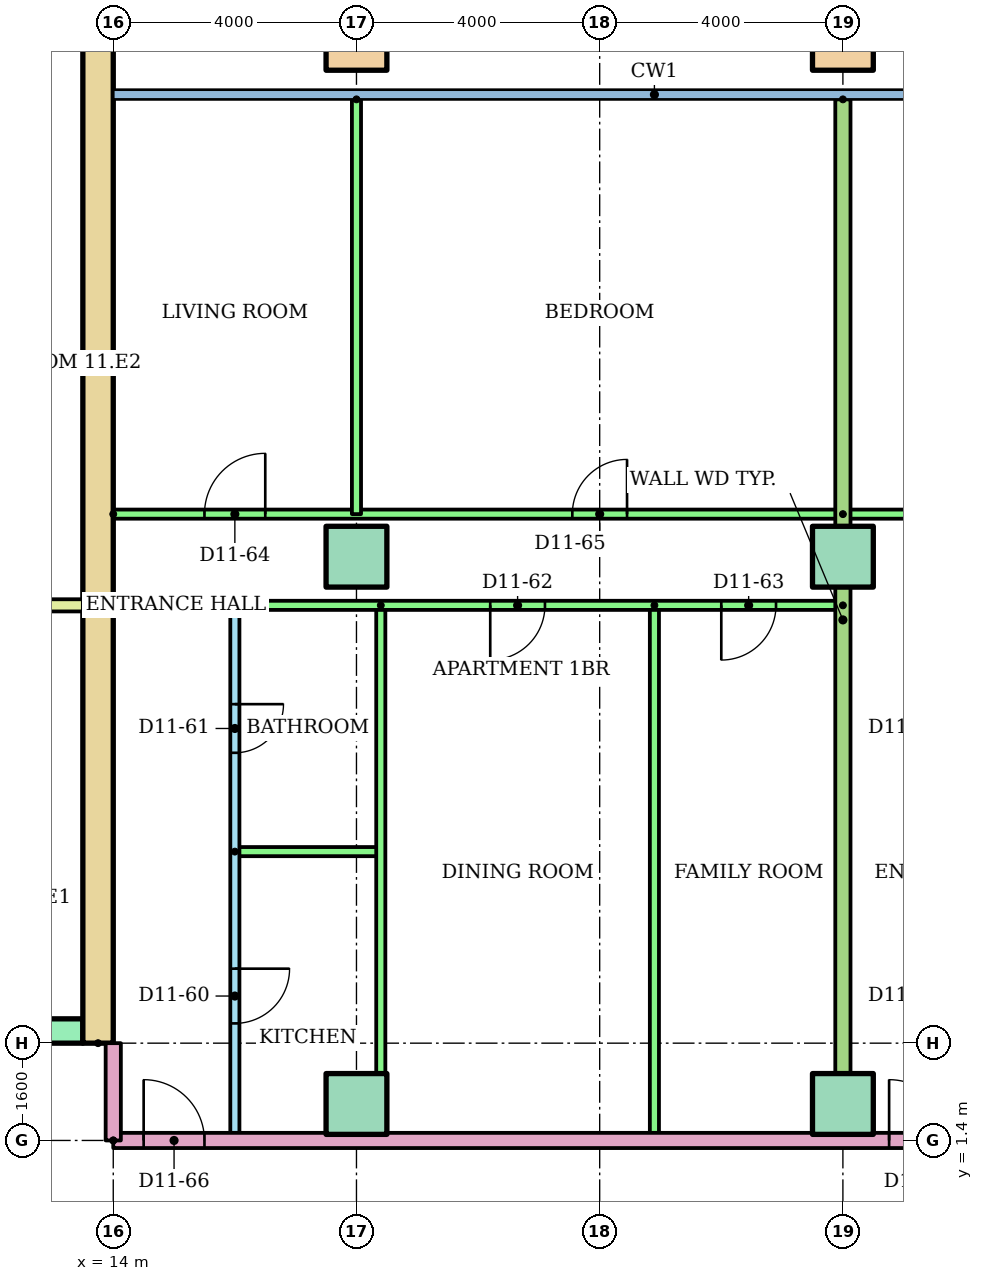
"""IFC4 building model, lengths in metres.
Left out: names, types, materials, properties, quantities, classifications, styles, units other than length and angle.
Written with IfcOpenShell. Run it as: python <this file> out.ifc"""

import sys

from ifc_helpers import new_model, si_unit, direction, frame, frame_2d, origin, origin_2d, place, context, subcontext, project, spatial, rectangle, hollow_rectangle, extrude, element, fill, save


model = new_model("IFC4")
c1 = context("Model", 3, precision=1e-05, world=origin(), true_north=direction((0.0, 1.0)))
c2 = subcontext(c1, "Body", "Model", "MODEL_VIEW")
j1 = project(units=[si_unit("LENGTHUNIT", "METRE"), si_unit("PLANEANGLEUNIT", "RADIAN")], contexts=[c1])
p1 = place(None, origin())
s1 = spatial("IfcSite", under=j1, at=p1, CompositionType="ELEMENT")
p2 = place(p1, origin())
s2 = spatial("IfcBuilding", under=s1, at=p2, CompositionType="ELEMENT")
p3 = place(p2, frame((0.0, 0.0, 44.8)))
s3 = spatial("IfcBuildingStorey", under=s2, at=p3, CompositionType="ELEMENT", Elevation=44.8)
for number, where in (
    (1, (18.0, 2.0, 0.0)),
    (2, (26.0, 2.0, 0.0)),
    (3, (18.0, 11.0, 0.0)),
    (4, (26.0, 11.0, 0.0)),
):
    element("IfcColumn", number, at=place(p3, frame(where)), inside=s3, PredefinedType="COLUMN", context=c2, shape_type="SweptSolid", body=[
        extrude(rectangle(XDim=1.0, YDim=1.0, at=origin_2d()), origin(), (0.0, 0.0, 1.0), 3.2),
    ])
for number, where in (
    (5, (18.0, 19.5, 0.0)),
    (6, (26.0, 19.5, 0.0)),
):
    element("IfcColumn", number, at=place(p3, frame(where)), inside=s3, PredefinedType="COLUMN", context=c2, shape_type="SweptSolid", body=[
        extrude(hollow_rectangle(XDim=1.0, YDim=1.0, WallThickness=0.05, at=origin_2d()), origin(), (0.0, 0.0, 1.0), 3.2),
    ])
p4 = place(p3, frame((13.75, 3.0, 0.0), z_axis=(0.0, 0.0, 1.0), x_axis=(0.0, 1.0, 0.0)))
e7 = element("IfcWall", 7, at=p4, inside=s3, PredefinedType="SHEAR", context=c2, shape_type="SweptSolid", body=[
    extrude(rectangle(XDim=17.0, YDim=0.5, at=frame_2d((8.5, 0.0))), origin(), (0.0, 0.0, 1.0), 2.92),
])
p5 = place(p3, frame((-13.5, 3.2, 0.0)))
e8 = element("IfcWall", 8, at=p5, inside=s3, PredefinedType="SHEAR", context=c2, shape_type="SweptSolid", body=[
    extrude(rectangle(XDim=27.0, YDim=0.4, at=frame_2d((13.5, 0.0))), origin(), (0.0, 0.0, 1.0), 2.92),
])
p6 = place(p5, frame((6.861, 0.0, 0.0)))
e9 = element("IfcOpeningElement", 9, at=p6, cuts=e8, PredefinedType="OPENING", context=c2, shape_type="SweptSolid", body=[
    extrude(rectangle(XDim=1.1, YDim=2.1, at=frame_2d((0.55, 1.05))), frame((0.0, 0.21, 0.0), z_axis=(0.0, -1.0, 0.0), x_axis=(1.0, 0.0, 0.0)), (0.0, 0.0, 1.0), 0.42),
])
p7 = place(p5, frame((9.906, 0.0, 0.0)))
e10 = element("IfcOpeningElement", 10, at=p7, cuts=e8, PredefinedType="OPENING", context=c2, shape_type="SweptSolid", body=[
    extrude(rectangle(XDim=1.1, YDim=2.1, at=frame_2d((0.55, 1.05))), frame((0.0, 0.21, 0.0), z_axis=(0.0, -1.0, 0.0), x_axis=(1.0, 0.0, 0.0)), (0.0, 0.0, 1.0), 0.42),
])
p8 = place(p5, frame((15.994, 0.0, 0.0)))
e11 = element("IfcOpeningElement", 11, at=p8, cuts=e8, PredefinedType="OPENING", context=c2, shape_type="SweptSolid", body=[
    extrude(rectangle(XDim=1.1, YDim=2.1, at=frame_2d((0.55, 1.05))), frame((0.0, 0.21, 0.0), z_axis=(0.0, -1.0, 0.0), x_axis=(1.0, 0.0, 0.0)), (0.0, 0.0, 1.0), 0.42),
])
p9 = place(p5, frame((19.039, 0.0, 0.0)))
e12 = element("IfcOpeningElement", 12, at=p9, cuts=e8, PredefinedType="OPENING", context=c2, shape_type="SweptSolid", body=[
    extrude(rectangle(XDim=1.1, YDim=2.1, at=frame_2d((0.55, 1.05))), frame((0.0, 0.21, 0.0), z_axis=(0.0, -1.0, 0.0), x_axis=(1.0, 0.0, 0.0)), (0.0, 0.0, 1.0), 0.42),
])
p10 = place(p5, frame((12.6, 0.0, 0.0)))
e13 = element("IfcOpeningElement", 13, at=p10, cuts=e8, PredefinedType="OPENING", context=c2, shape_type="SweptSolid", body=[
    extrude(rectangle(XDim=1.8, YDim=2.1, at=frame_2d((0.9, 1.05))), frame((0.0, 0.21, 0.0), z_axis=(0.0, -1.0, 0.0), x_axis=(1.0, 0.0, 0.0)), (0.0, 0.0, 1.0), 0.42),
])
p11 = place(p3, frame((9.6, 10.2, 0.0)))
e14 = element("IfcWall", 14, at=p11, inside=s3, PredefinedType="PARTITIONING", context=c2, shape_type="SweptSolid", body=[
    extrude(rectangle(XDim=3.9, YDim=0.2, at=frame_2d((1.95, 0.0))), origin(), (0.0, 0.0, 1.0), 2.92),
])
p12 = place(p3, frame((16.0, 10.2, 0.0), z_axis=(0.0, 0.0, 1.0), x_axis=(0.0, -1.0, 0.0)))
e15 = element("IfcWall", 15, at=p12, inside=s3, PredefinedType="PARTITIONING", context=c2, shape_type="SweptSolid", body=[
    extrude(rectangle(XDim=8.8, YDim=0.15, at=frame_2d((4.4, 0.0))), origin(), (0.0, 0.0, 1.0), 2.4),
])
p13 = place(p12, frame((5.975, 0.0, 0.0)))
e16 = element("IfcOpeningElement", 16, at=p13, cuts=e15, PredefinedType="OPENING", context=c2, shape_type="SweptSolid", body=[
    extrude(rectangle(XDim=0.9, YDim=2.1, at=frame_2d((0.45, 1.05))), frame((0.0, 0.085, 0.0), z_axis=(0.0, -1.0, 0.0), x_axis=(1.0, 0.0, 0.0)), (0.0, 0.0, 1.0), 0.17),
])
p14 = place(p12, frame((1.625, 0.0, 0.0)))
e17 = element("IfcOpeningElement", 17, at=p14, cuts=e15, PredefinedType="OPENING", context=c2, shape_type="SweptSolid", body=[
    extrude(rectangle(XDim=0.8, YDim=2.1, at=frame_2d((0.4, 1.05))), frame((0.0, 0.085, 0.0), z_axis=(0.0, -1.0, 0.0), x_axis=(1.0, 0.0, 0.0)), (0.0, 0.0, 1.0), 0.17),
])
p15 = place(p3, frame((16.0, 6.15, 0.0)))
e18 = element("IfcWall", 18, at=p15, inside=s3, PredefinedType="PARTITIONING", context=c2, shape_type="SweptSolid", body=[
    extrude(rectangle(XDim=2.4, YDim=0.15, at=frame_2d((1.2, 0.0))), origin(), (0.0, 0.0, 1.0), 2.4),
])
for number, where, z_axis, x_axis in (
    (19, (18.4, 10.2, 0.0), (0.0, 0.0, 1.0), (0.0, -1.0, 0.0)),
    (20, (22.9, 10.2, 0.0), (0.0, 0.0, 1.0), (0.0, -1.0, 0.0)),
):
    element("IfcWall", number, at=place(p3, frame(where, z_axis=z_axis, x_axis=x_axis)), inside=s3, PredefinedType="PARTITIONING", context=c2, shape_type="SweptSolid", body=[
        extrude(rectangle(XDim=8.8, YDim=0.15, at=frame_2d((4.4, 0.0))), origin(), (0.0, 0.0, 1.0), 2.4),
    ])
p16 = place(p3, frame((26.0, 10.2, 0.0), z_axis=(0.0, 0.0, 1.0), x_axis=(-1.0, 0.0, 0.0)))
e21 = element("IfcWall", 21, at=p16, inside=s3, PredefinedType="PARTITIONING", context=c2, shape_type="SweptSolid", body=[
    extrude(rectangle(XDim=10.0, YDim=0.15, at=frame_2d((5.0, 0.0))), origin(), (0.0, 0.0, 1.0), 2.4),
])
p17 = place(p16, frame((4.9, 0.0, 0.0)))
e22 = element("IfcOpeningElement", 22, at=p17, cuts=e21, PredefinedType="OPENING", context=c2, shape_type="SweptSolid", body=[
    extrude(rectangle(XDim=0.9, YDim=2.1, at=frame_2d((0.45, 1.05))), frame((0.0, 0.085, 0.0), z_axis=(0.0, -1.0, 0.0), x_axis=(1.0, 0.0, 0.0)), (0.0, 0.0, 1.0), 0.17),
])
p18 = place(p16, frame((1.1, 0.0, 0.0)))
e23 = element("IfcOpeningElement", 23, at=p18, cuts=e21, PredefinedType="OPENING", context=c2, shape_type="SweptSolid", body=[
    extrude(rectangle(XDim=0.9, YDim=2.1, at=frame_2d((0.45, 1.05))), frame((0.0, 0.085, 0.0), z_axis=(0.0, -1.0, 0.0), x_axis=(1.0, 0.0, 0.0)), (0.0, 0.0, 1.0), 0.17),
])
p19 = place(p3, frame((14.0, 11.7, 0.0)))
e24 = element("IfcWall", 24, at=p19, inside=s3, PredefinedType="PARTITIONING", context=c2, shape_type="SweptSolid", body=[
    extrude(rectangle(XDim=12.0, YDim=0.15, at=frame_2d((6.0, 0.0))), origin(), (0.0, 0.0, 1.0), 2.4),
])
p20 = place(p19, frame((1.5, 0.0, 0.0)))
e25 = element("IfcOpeningElement", 25, at=p20, cuts=e24, PredefinedType="OPENING", context=c2, shape_type="SweptSolid", body=[
    extrude(rectangle(XDim=1.0, YDim=2.1, at=frame_2d((0.5, 1.05))), frame((0.0, 0.085, 0.0), z_axis=(0.0, -1.0, 0.0), x_axis=(1.0, 0.0, 0.0)), (0.0, 0.0, 1.0), 0.17),
])
p21 = place(p19, frame((7.55, 0.0, 0.0)))
e26 = element("IfcOpeningElement", 26, at=p21, cuts=e24, PredefinedType="OPENING", context=c2, shape_type="SweptSolid", body=[
    extrude(rectangle(XDim=0.9, YDim=2.1, at=frame_2d((0.45, 1.05))), frame((0.0, 0.085, 0.0), z_axis=(0.0, -1.0, 0.0), x_axis=(1.0, 0.0, 0.0)), (0.0, 0.0, 1.0), 0.17),
])
p22 = place(p3, frame((18.0, 18.521, 0.0), z_axis=(0.0, 0.0, 1.0), x_axis=(0.0, -1.0, 0.0)))
e27 = element("IfcWall", 27, at=p22, inside=s3, PredefinedType="PARTITIONING", context=c2, shape_type="SweptSolid", body=[
    extrude(rectangle(XDim=6.821, YDim=0.15, at=frame_2d((3.411, 0.0))), origin(), (0.0, 0.0, 1.0), 2.4),
])
p23 = place(p3, frame((26.0, 11.7, 0.0)))
e28 = element("IfcWall", 28, at=p23, inside=s3, PredefinedType="PARTITIONING", context=c2, shape_type="SweptSolid", body=[
    extrude(rectangle(XDim=10.52, YDim=0.15, at=frame_2d((5.26, 0.0))), origin(), (0.0, 0.0, 1.0), 2.4),
])
p24 = place(p23, frame((2.4, 0.0, 0.0)))
e29 = element("IfcOpeningElement", 29, at=p24, cuts=e28, PredefinedType="OPENING", context=c2, shape_type="SweptSolid", body=[
    extrude(rectangle(XDim=1.0, YDim=2.1, at=frame_2d((0.5, 1.05))), frame((0.0, 0.085, 0.0), z_axis=(0.0, -1.0, 0.0), x_axis=(1.0, 0.0, 0.0)), (0.0, 0.0, 1.0), 0.17),
])
p25 = place(p23, frame((8.76, 0.0, 0.0)))
e30 = element("IfcOpeningElement", 30, at=p25, cuts=e28, PredefinedType="OPENING", context=c2, shape_type="SweptSolid", body=[
    extrude(rectangle(XDim=1.0, YDim=2.1, at=frame_2d((0.5, 1.05))), frame((0.0, 0.085, 0.0), z_axis=(0.0, -1.0, 0.0), x_axis=(1.0, 0.0, 0.0)), (0.0, 0.0, 1.0), 0.17),
])
p26 = place(p3, frame((26.0, 18.521, 0.0), z_axis=(0.0, 0.0, 1.0), x_axis=(0.0, -1.0, 0.0)))
e31 = element("IfcWall", 31, at=p26, inside=s3, PredefinedType="PARTITIONING", context=c2, shape_type="SweptSolid", body=[
    extrude(rectangle(XDim=17.121, YDim=0.25, at=frame_2d((8.561, 0.0))), origin(), (0.0, 0.0, 1.0), 2.4),
])
p27 = place(p3, frame((14.0, 1.4, 0.0)))
e32 = element("IfcWall", 32, at=p27, inside=s3, PredefinedType="PARTITIONING", context=c2, shape_type="SweptSolid", body=[
    extrude(rectangle(XDim=15.0, YDim=0.25, at=frame_2d((7.5, 0.0))), origin(), (0.0, 0.0, 1.0), 2.4),
])
p28 = place(p27, frame((0.5, 0.0, 0.0)))
e33 = element("IfcOpeningElement", 33, at=p28, cuts=e32, PredefinedType="OPENING", context=c2, shape_type="SweptSolid", body=[
    extrude(rectangle(XDim=1.0, YDim=2.1, at=frame_2d((0.5, 1.05))), frame((0.0, 0.135, 0.0), z_axis=(0.0, -1.0, 0.0), x_axis=(1.0, 0.0, 0.0)), (0.0, 0.0, 1.0), 0.27),
])
p29 = place(p27, frame((12.76, 0.0, 0.0)))
e34 = element("IfcOpeningElement", 34, at=p29, cuts=e32, PredefinedType="OPENING", context=c2, shape_type="SweptSolid", body=[
    extrude(rectangle(XDim=1.0, YDim=2.1, at=frame_2d((0.5, 1.05))), frame((0.0, 0.135, 0.0), z_axis=(0.0, -1.0, 0.0), x_axis=(1.0, 0.0, 0.0)), (0.0, 0.0, 1.0), 0.27),
])
p30 = place(p3, frame((14.0, 1.4, 0.0), z_axis=(0.0, 0.0, 1.0), x_axis=(0.0, 1.0, 0.0)))
e35 = element("IfcWall", 35, at=p30, inside=s3, PredefinedType="PARTITIONING", context=c2, shape_type="SweptSolid", body=[
    extrude(rectangle(XDim=1.6, YDim=0.25, at=frame_2d((0.8, 0.0))), origin(), (0.0, 0.0, 1.0), 2.4),
])
p31 = place(p13, origin())
e36 = element("IfcDoor", 36, at=p31, inside=s3, OperationType="SINGLE_SWING_LEFT", PredefinedType="DOOR", context=c2, shape_type="SweptSolid", body=[
    extrude(rectangle(XDim=0.9, YDim=2.1, at=frame_2d((0.45, 1.05))), frame((0.0, 0.025, 0.0), z_axis=(0.0, -1.0, 0.0), x_axis=(1.0, 0.0, 0.0)), (0.0, 0.0, 1.0), 0.05),
])
fill(e16, e36)
p32 = place(p14, origin())
e37 = element("IfcDoor", 37, at=p32, inside=s3, OperationType="SINGLE_SWING_LEFT", PredefinedType="DOOR", context=c2, shape_type="SweptSolid", body=[
    extrude(rectangle(XDim=0.8, YDim=2.1, at=frame_2d((0.4, 1.05))), frame((0.0, 0.025, 0.0), z_axis=(0.0, -1.0, 0.0), x_axis=(1.0, 0.0, 0.0)), (0.0, 0.0, 1.0), 0.05),
])
fill(e17, e37)
p33 = place(p17, origin())
e38 = element("IfcDoor", 38, at=p33, inside=s3, OperationType="SINGLE_SWING_RIGHT", PredefinedType="DOOR", context=c2, shape_type="SweptSolid", body=[
    extrude(rectangle(XDim=0.9, YDim=2.1, at=frame_2d((0.45, 1.05))), frame((0.0, 0.025, 0.0), z_axis=(0.0, -1.0, 0.0), x_axis=(1.0, 0.0, 0.0)), (0.0, 0.0, 1.0), 0.05),
])
fill(e22, e38)
p34 = place(p18, origin())
e39 = element("IfcDoor", 39, at=p34, inside=s3, OperationType="SINGLE_SWING_RIGHT", PredefinedType="DOOR", context=c2, shape_type="SweptSolid", body=[
    extrude(rectangle(XDim=0.9, YDim=2.1, at=frame_2d((0.45, 1.05))), frame((0.0, 0.025, 0.0), z_axis=(0.0, -1.0, 0.0), x_axis=(1.0, 0.0, 0.0)), (0.0, 0.0, 1.0), 0.05),
])
fill(e23, e39)
p35 = place(p20, origin())
e40 = element("IfcDoor", 40, at=p35, inside=s3, OperationType="SINGLE_SWING_RIGHT", PredefinedType="DOOR", context=c2, shape_type="SweptSolid", body=[
    extrude(rectangle(XDim=1.0, YDim=2.1, at=frame_2d((0.5, 1.05))), frame((0.0, 0.025, 0.0), z_axis=(0.0, -1.0, 0.0), x_axis=(1.0, 0.0, 0.0)), (0.0, 0.0, 1.0), 0.05),
])
fill(e25, e40)
p36 = place(p21, origin())
e41 = element("IfcDoor", 41, at=p36, inside=s3, OperationType="SINGLE_SWING_RIGHT", PredefinedType="DOOR", context=c2, shape_type="SweptSolid", body=[
    extrude(rectangle(XDim=0.9, YDim=2.1, at=frame_2d((0.45, 1.05))), frame((0.0, 0.025, 0.0), z_axis=(0.0, -1.0, 0.0), x_axis=(1.0, 0.0, 0.0)), (0.0, 0.0, 1.0), 0.05),
])
fill(e26, e41)
p37 = place(p28, origin())
e42 = element("IfcDoor", 42, at=p37, inside=s3, OperationType="SINGLE_SWING_LEFT", PredefinedType="DOOR", context=c2, shape_type="SweptSolid", body=[
    extrude(rectangle(XDim=1.0, YDim=2.1, at=frame_2d((0.5, 1.05))), frame((0.0, 0.025, 0.0), z_axis=(0.0, -1.0, 0.0), x_axis=(1.0, 0.0, 0.0)), (0.0, 0.0, 1.0), 0.05),
])
fill(e33, e42)
p38 = place(p29, origin())
e43 = element("IfcDoor", 43, at=p38, inside=s3, OperationType="SINGLE_SWING_LEFT", PredefinedType="DOOR", context=c2, shape_type="SweptSolid", body=[
    extrude(rectangle(XDim=1.0, YDim=2.1, at=frame_2d((0.5, 1.05))), frame((0.0, 0.025, 0.0), z_axis=(0.0, -1.0, 0.0), x_axis=(1.0, 0.0, 0.0)), (0.0, 0.0, 1.0), 0.05),
])
fill(e34, e43)
save(model, sys.argv[1])
